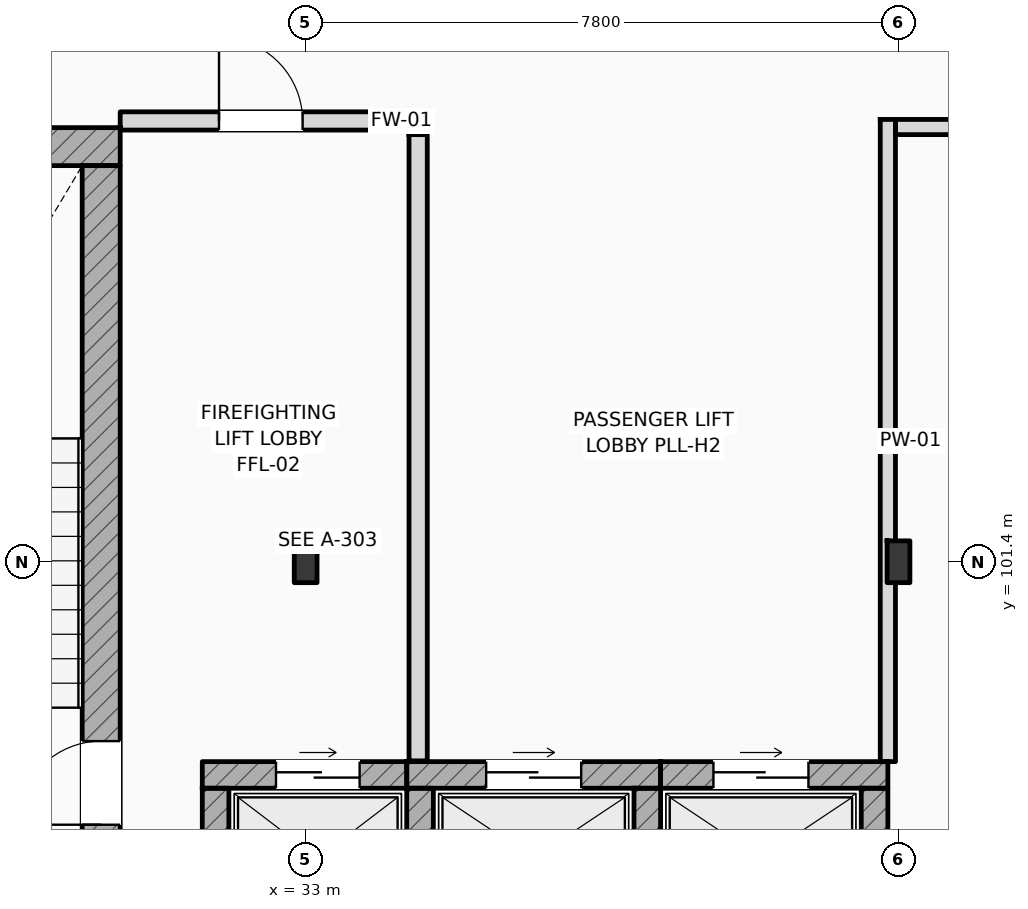
"""IFC4 building model, lengths in metres.
Left out: names, types, materials, properties, quantities, classifications, styles, units other than length and angle.
Written with IfcOpenShell. Run it as: python <this file> out.ifc"""

import sys

from ifc_helpers import new_model, si_unit, direction, frame, frame_2d, origin, origin_2d, place, context, subcontext, project, spatial, rectangle, i_section, extrude, element, fill, save


model = new_model("IFC4")
c1 = context("Model", 3, precision=1e-05, world=origin(), true_north=direction((0.0, 1.0)))
c2 = subcontext(c1, "Body", "Model", "MODEL_VIEW")
j1 = project(units=[si_unit("LENGTHUNIT", "METRE"), si_unit("PLANEANGLEUNIT", "RADIAN")], contexts=[c1])
p1 = place(None, origin())
s1 = spatial("IfcSite", under=j1, at=p1, CompositionType="ELEMENT")
p2 = place(p1, origin())
s2 = spatial("IfcBuilding", under=s1, at=p2, CompositionType="ELEMENT")
p3 = place(p2, frame((0.0, 0.0, 16.2)))
s3 = spatial("IfcBuildingStorey", under=s2, at=p3, CompositionType="ELEMENT", Elevation=16.2)
for number, where, z_axis, x_axis in (
    (1, (33.0, 101.4, 0.0), (0.0, 0.0, 1.0), (1.0, 0.0, 0.0)),
    (2, (40.8, 101.4, 0.0), (0.0, 0.0, 1.0), (1.0, 0.0, 0.0)),
):
    element("IfcColumn", number, at=place(p3, frame(where, z_axis=z_axis, x_axis=x_axis)), inside=s3, PredefinedType="COLUMN", context=c2, shape_type="SweptSolid", body=[
        extrude(i_section(OverallWidth=0.3, OverallDepth=0.55, WebThickness=0.015, FlangeThickness=0.029, FilletRadius=0.027, at=origin_2d()), origin(), (0.0, 0.0, 1.0), 4.2),
    ])
p4 = place(p3, frame((25.4, 106.862, 0.0), z_axis=(0.0, 0.0, 1.0), x_axis=(1.0, 0.0, 0.0)))
e3 = element("IfcWall", 3, at=p4, inside=s3, PredefinedType="SHEAR", context=c2, shape_type="SweptSolid", body=[
    extrude(rectangle(XDim=5.16, YDim=0.5, at=frame_2d((2.58, 0.0))), origin(), (0.0, 0.0, 1.0), 4.2),
])
p5 = place(p3, frame((30.31, 97.5, 0.0), z_axis=(0.0, 0.0, 1.0), x_axis=(0.0, 1.0, 0.0)))
e4 = element("IfcWall", 4, at=p5, inside=s3, PredefinedType="SHEAR", context=c2, shape_type="SweptSolid", body=[
    extrude(rectangle(XDim=9.112, YDim=0.5, at=frame_2d((4.556, 0.0))), origin(), (0.0, 0.0, 1.0), 4.2),
])
p6 = place(p5, frame((0.44, 0.0, 0.0)))
e5 = element("IfcOpeningElement", 5, at=p6, cuts=e4, PredefinedType="OPENING", context=c2, shape_type="SweptSolid", body=[
    extrude(rectangle(XDim=1.1, YDim=2.2, at=frame_2d((0.55, 1.1))), frame((0.0, 0.26, 0.0), z_axis=(0.0, -1.0, 0.0), x_axis=(1.0, 0.0, 0.0)), (0.0, 0.0, 1.0), 0.52),
])
p7 = place(p3, frame((31.64, 98.595, 0.0), z_axis=(0.0, 0.0, 1.0), x_axis=(1.0, 0.0, 0.0)))
e6 = element("IfcWall", 6, at=p7, inside=s3, PredefinedType="SHEAR", context=c2, shape_type="SweptSolid", body=[
    extrude(rectangle(XDim=2.69, YDim=0.35, at=frame_2d((1.345, 0.0))), origin(), (0.0, 0.0, 1.0), 3.92),
])
p8 = place(p7, frame((0.97, 0.0, 0.0)))
e7 = element("IfcOpeningElement", 7, at=p8, cuts=e6, PredefinedType="OPENING", context=c2, shape_type="SweptSolid", body=[
    extrude(rectangle(XDim=1.1, YDim=2.2, at=frame_2d((0.55, 1.1))), frame((0.0, 0.185, 0.0), z_axis=(0.0, -1.0, 0.0), x_axis=(1.0, 0.0, 0.0)), (0.0, 0.0, 1.0), 0.37),
])
p9 = place(p3, frame((31.815, 96.58, 0.0), z_axis=(0.0, 0.0, 1.0), x_axis=(0.0, 1.0, 0.0)))
e8 = element("IfcWall", 8, at=p9, inside=s3, PredefinedType="SHEAR", context=c2, shape_type="SweptSolid", body=[
    extrude(rectangle(XDim=1.84, YDim=0.35, at=frame_2d((0.92, 0.0))), origin(), (0.0, 0.0, 1.0), 3.92),
])
p10 = place(p3, frame((34.33, 98.595, 0.0), z_axis=(0.0, 0.0, 1.0), x_axis=(1.0, 0.0, 0.0)))
e9 = element("IfcWall", 9, at=p10, inside=s3, PredefinedType="SHEAR", context=c2, shape_type="SweptSolid", body=[
    extrude(rectangle(XDim=3.34, YDim=0.35, at=frame_2d((1.67, 0.0))), origin(), (0.0, 0.0, 1.0), 3.92),
])
p11 = place(p10, frame((1.045, 0.0, 0.0)))
e10 = element("IfcOpeningElement", 10, at=p11, cuts=e9, PredefinedType="OPENING", context=c2, shape_type="SweptSolid", body=[
    extrude(rectangle(XDim=1.25, YDim=2.25, at=frame_2d((0.625, 1.125))), frame((0.0, 0.185, 0.0), z_axis=(0.0, -1.0, 0.0), x_axis=(1.0, 0.0, 0.0)), (0.0, 0.0, 1.0), 0.37),
])
for number, where, z_axis, x_axis in (
    (11, (34.505, 96.58, 0.0), (0.0, 0.0, 1.0), (0.0, 1.0, 0.0)),
    (12, (37.495, 96.58, 0.0), (0.0, 0.0, 1.0), (0.0, 1.0, 0.0)),
):
    element("IfcWall", number, at=place(p3, frame(where, z_axis=z_axis, x_axis=x_axis)), inside=s3, PredefinedType="SHEAR", context=c2, shape_type="SweptSolid", body=[
        extrude(rectangle(XDim=1.84, YDim=0.35, at=frame_2d((0.92, 0.0))), origin(), (0.0, 0.0, 1.0), 3.92),
    ])
p12 = place(p3, frame((37.67, 98.595, 0.0), z_axis=(0.0, 0.0, 1.0), x_axis=(1.0, 0.0, 0.0)))
e13 = element("IfcWall", 13, at=p12, inside=s3, PredefinedType="SHEAR", context=c2, shape_type="SweptSolid", body=[
    extrude(rectangle(XDim=2.99, YDim=0.35, at=frame_2d((1.495, 0.0))), origin(), (0.0, 0.0, 1.0), 3.92),
])
p13 = place(p12, frame((0.695, 0.0, 0.0)))
e14 = element("IfcOpeningElement", 14, at=p13, cuts=e13, PredefinedType="OPENING", context=c2, shape_type="SweptSolid", body=[
    extrude(rectangle(XDim=1.25, YDim=2.25, at=frame_2d((0.625, 1.125))), frame((0.0, 0.185, 0.0), z_axis=(0.0, -1.0, 0.0), x_axis=(1.0, 0.0, 0.0)), (0.0, 0.0, 1.0), 0.37),
])
p14 = place(p3, frame((40.485, 96.58, 0.0), z_axis=(0.0, 0.0, 1.0), x_axis=(0.0, 1.0, 0.0)))
e15 = element("IfcWall", 15, at=p14, inside=s3, PredefinedType="SHEAR", context=c2, shape_type="SweptSolid", body=[
    extrude(rectangle(XDim=1.84, YDim=0.35, at=frame_2d((0.92, 0.0))), origin(), (0.0, 0.0, 1.0), 3.51),
])
p15 = place(p3, frame((34.48, 98.78, 0.0), z_axis=(0.0, 0.0, 1.0), x_axis=(0.0, 1.0, 0.0)))
e16 = element("IfcWall", 16, at=p15, inside=s3, PredefinedType="STANDARD", context=c2, shape_type="SweptSolid", body=[
    extrude(rectangle(XDim=8.24, YDim=0.24, at=frame_2d((4.12, 0.0))), origin(), (0.0, 0.0, 1.0), 3.92),
])
p16 = place(p3, frame((30.56, 107.2, 0.0), z_axis=(0.0, 0.0, 1.0), x_axis=(1.0, 0.0, 0.0)))
e17 = element("IfcWall", 17, at=p16, inside=s3, PredefinedType="STANDARD", context=c2, shape_type="SweptSolid", body=[
    extrude(rectangle(XDim=4.1, YDim=0.24, at=frame_2d((2.05, 0.0))), origin(), (0.0, 0.0, 1.0), 3.92),
])
p17 = place(p16, frame((1.3, 0.0, 0.0)))
e18 = element("IfcOpeningElement", 18, at=p17, cuts=e17, PredefinedType="OPENING", context=c2, shape_type="SweptSolid", body=[
    extrude(rectangle(XDim=1.1, YDim=2.2, at=frame_2d((0.55, 1.1))), frame((0.0, 0.13, 0.0), z_axis=(0.0, -1.0, 0.0), x_axis=(1.0, 0.0, 0.0)), (0.0, 0.0, 1.0), 0.26),
])
p18 = place(p3, frame((40.76, 107.12, 0.0), z_axis=(0.0, 0.0, 1.0), x_axis=(1.0, 0.0, 0.0)))
e19 = element("IfcWall", 19, at=p18, inside=s3, PredefinedType="PARTITIONING", context=c2, shape_type="SweptSolid", body=[
    extrude(rectangle(XDim=23.44, YDim=0.2, at=frame_2d((11.72, 0.0))), origin(), (0.0, 0.0, 1.0), 3.92),
])
p19 = place(p18, frame((11.0, 0.0, 0.0)))
e20 = element("IfcOpeningElement", 20, at=p19, cuts=e19, PredefinedType="OPENING", context=c2, shape_type="SweptSolid", body=[
    extrude(rectangle(XDim=1.3, YDim=2.2, at=frame_2d((0.65, 1.1))), frame((0.0, 0.11, 0.0), z_axis=(0.0, -1.0, 0.0), x_axis=(1.0, 0.0, 0.0)), (0.0, 0.0, 1.0), 0.22),
])
p20 = place(p3, frame((40.66, 98.77, 0.0), z_axis=(0.0, 0.0, 1.0), x_axis=(0.0, 1.0, 0.0)))
e21 = element("IfcWall", 21, at=p20, inside=s3, PredefinedType="PARTITIONING", context=c2, shape_type="SweptSolid", body=[
    extrude(rectangle(XDim=8.45, YDim=0.2, at=frame_2d((4.225, 0.0))), origin(), (0.0, 0.0, 1.0), 3.51),
])
p21 = place(p6, origin())
e22 = element("IfcDoor", 22, at=p21, inside=s3, OperationType="SINGLE_SWING_LEFT", PredefinedType="DOOR", context=c2, shape_type="SweptSolid", body=[
    extrude(rectangle(XDim=1.1, YDim=2.2, at=frame_2d((0.55, 1.1))), frame((0.0, 0.025, 0.0), z_axis=(0.0, -1.0, 0.0), x_axis=(1.0, 0.0, 0.0)), (0.0, 0.0, 1.0), 0.05),
])
fill(e5, e22)
p22 = place(p8, origin())
e23 = element("IfcDoor", 23, at=p22, inside=s3, OperationType="SLIDING_TO_LEFT", PredefinedType="DOOR", context=c2, shape_type="SweptSolid", body=[
    extrude(rectangle(XDim=1.1, YDim=2.2, at=frame_2d((0.55, 1.1))), frame((0.0, 0.025, 0.0), z_axis=(0.0, -1.0, 0.0), x_axis=(1.0, 0.0, 0.0)), (0.0, 0.0, 1.0), 0.05),
])
fill(e7, e23)
p23 = place(p11, origin())
e24 = element("IfcDoor", 24, at=p23, inside=s3, OperationType="SLIDING_TO_LEFT", PredefinedType="DOOR", context=c2, shape_type="SweptSolid", body=[
    extrude(rectangle(XDim=1.25, YDim=2.25, at=frame_2d((0.625, 1.125))), frame((0.0, 0.025, 0.0), z_axis=(0.0, -1.0, 0.0), x_axis=(1.0, 0.0, 0.0)), (0.0, 0.0, 1.0), 0.05),
])
fill(e10, e24)
p24 = place(p13, origin())
e25 = element("IfcDoor", 25, at=p24, inside=s3, OperationType="SLIDING_TO_LEFT", PredefinedType="DOOR", context=c2, shape_type="SweptSolid", body=[
    extrude(rectangle(XDim=1.25, YDim=2.25, at=frame_2d((0.625, 1.125))), frame((0.0, 0.025, 0.0), z_axis=(0.0, -1.0, 0.0), x_axis=(1.0, 0.0, 0.0)), (0.0, 0.0, 1.0), 0.05),
])
fill(e14, e25)
p25 = place(p17, origin())
e26 = element("IfcDoor", 26, at=p25, inside=s3, OperationType="SINGLE_SWING_LEFT", PredefinedType="DOOR", context=c2, shape_type="SweptSolid", body=[
    extrude(rectangle(XDim=1.1, YDim=2.2, at=frame_2d((0.55, 1.1))), frame((0.0, 0.025, 0.0), z_axis=(0.0, -1.0, 0.0), x_axis=(1.0, 0.0, 0.0)), (0.0, 0.0, 1.0), 0.05),
])
fill(e18, e26)
save(model, sys.argv[1])
